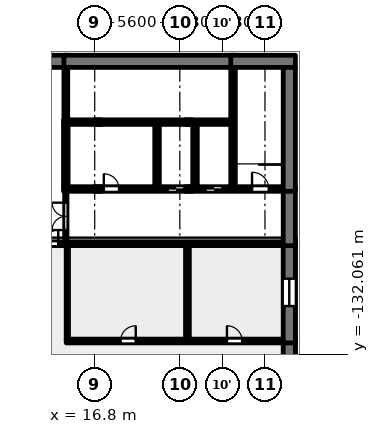
"""IFC4 building model, lengths in metres.
Left out: names, types, materials, properties, quantities, classifications, styles, units other than length and angle.
Written with IfcOpenShell. Run it as: python <this file> out.ifc"""

import sys

from ifc_helpers import new_model, si_unit, direction, frame, frame_2d, origin, origin_2d, place, context, subcontext, project, spatial, rectangle, extrude, element, fill, save


model = new_model("IFC4")
c1 = context("Model", 3, precision=1e-05, world=origin(), true_north=direction((0.0, 1.0)))
c2 = subcontext(c1, "Body", "Model", "MODEL_VIEW")
j1 = project(units=[si_unit("LENGTHUNIT", "METRE"), si_unit("PLANEANGLEUNIT", "RADIAN")], contexts=[c1])
p1 = place(None, origin())
s1 = spatial("IfcSite", under=j1, at=p1, CompositionType="ELEMENT")
p2 = place(p1, origin())
s2 = spatial("IfcBuilding", under=s1, at=p2, CompositionType="ELEMENT")
p3 = place(p2, frame((0.0, 0.0, 20.9)))
s3 = spatial("IfcBuildingStorey", under=s2, at=p3, CompositionType="ELEMENT", Elevation=20.9)
p4 = place(p3, frame((14.925, -131.2, 0.0), z_axis=(0.0, 0.0, 1.0), x_axis=(1.0, 0.0, 0.0)))
e1 = element("IfcWall", 1, at=p4, inside=s3, PredefinedType="SOLIDWALL", context=c2, shape_type="SweptSolid", body=[
    extrude(rectangle(XDim=14.275, YDim=0.25, at=frame_2d((7.137, 0.0))), origin(), (0.0, 0.0, 1.0), 4.5),
])
p5 = place(p4, frame((3.575, 0.0, 0.0)))
e2 = element("IfcOpeningElement", 2, at=p5, cuts=e1, PredefinedType="OPENING", context=c2, shape_type="SweptSolid", body=[
    extrude(rectangle(XDim=1.0, YDim=2.1, at=frame_2d((0.5, 1.05))), frame((0.0, 0.135, 0.0), z_axis=(0.0, -1.0, 0.0), x_axis=(1.0, 0.0, 0.0)), (0.0, 0.0, 1.0), 0.27),
])
p6 = place(p4, frame((10.575, 0.0, 0.0)))
e3 = element("IfcOpeningElement", 3, at=p6, cuts=e1, PredefinedType="OPENING", context=c2, shape_type="SweptSolid", body=[
    extrude(rectangle(XDim=1.0, YDim=2.1, at=frame_2d((0.5, 1.05))), frame((0.0, 0.135, 0.0), z_axis=(0.0, -1.0, 0.0), x_axis=(1.0, 0.0, 0.0)), (0.0, 0.0, 1.0), 0.27),
])
p7 = place(p3, frame((12.4, -124.8, 0.0), z_axis=(0.0, 0.0, 1.0), x_axis=(1.0, 0.0, 0.0)))
e4 = element("IfcWall", 4, at=p7, inside=s3, PredefinedType="SOLIDWALL", context=c2, shape_type="SweptSolid", body=[
    extrude(rectangle(XDim=16.8, YDim=0.25, at=frame_2d((8.4, 0.0))), origin(), (0.0, 0.0, 1.0), 4.5),
])
p8 = place(p7, frame((0.2, 0.0, 0.0)))
e5 = element("IfcOpeningElement", 5, at=p8, cuts=e4, PredefinedType="OPENING", context=c2, shape_type="SweptSolid", body=[
    extrude(rectangle(XDim=1.8, YDim=2.1, at=frame_2d((0.9, 1.05))), frame((0.0, 0.135, 0.0), z_axis=(0.0, -1.0, 0.0), x_axis=(1.0, 0.0, 0.0)), (0.0, 0.0, 1.0), 0.27),
])
p9 = place(p3, frame((14.75, -121.2, 0.0), z_axis=(0.0, 0.0, 1.0), x_axis=(1.0, 0.0, 0.0)))
e6 = element("IfcWall", 6, at=p9, inside=s3, PredefinedType="SOLIDWALL", context=c2, shape_type="SweptSolid", body=[
    extrude(rectangle(XDim=14.45, YDim=0.3, at=frame_2d((7.225, 0.0))), origin(), (0.0, 0.0, 1.0), 4.5),
])
p10 = place(p9, frame((6.85, 0.0, 0.0)))
e7 = element("IfcOpeningElement", 7, at=p10, cuts=e6, PredefinedType="OPENING", context=c2, shape_type="SweptSolid", body=[
    extrude(rectangle(XDim=1.1, YDim=2.1, at=frame_2d((0.55, 1.05))), frame((0.0, 0.16, 0.0), z_axis=(0.0, -1.0, 0.0), x_axis=(1.0, 0.0, 0.0)), (0.0, 0.0, 1.0), 0.32),
])
p11 = place(p9, frame((9.35, 0.0, 0.0)))
e8 = element("IfcOpeningElement", 8, at=p11, cuts=e6, PredefinedType="OPENING", context=c2, shape_type="SweptSolid", body=[
    extrude(rectangle(XDim=1.1, YDim=2.1, at=frame_2d((0.55, 1.05))), frame((0.0, 0.16, 0.0), z_axis=(0.0, -1.0, 0.0), x_axis=(1.0, 0.0, 0.0)), (0.0, 0.0, 1.0), 0.32),
])
p12 = place(p9, frame((12.4, 0.0, 0.0)))
e9 = element("IfcOpeningElement", 9, at=p12, cuts=e6, PredefinedType="OPENING", context=c2, shape_type="SweptSolid", body=[
    extrude(rectangle(XDim=1.1, YDim=2.1, at=frame_2d((0.55, 1.05))), frame((0.0, 0.16, 0.0), z_axis=(0.0, -1.0, 0.0), x_axis=(1.0, 0.0, 0.0)), (0.0, 0.0, 1.0), 0.32),
])
p13 = place(p9, frame((2.65, 0.0, 0.0)))
e10 = element("IfcOpeningElement", 10, at=p13, cuts=e6, PredefinedType="OPENING", context=c2, shape_type="SweptSolid", body=[
    extrude(rectangle(XDim=1.0, YDim=2.1, at=frame_2d((0.5, 1.05))), frame((0.0, 0.16, 0.0), z_axis=(0.0, -1.0, 0.0), x_axis=(1.0, 0.0, 0.0)), (0.0, 0.0, 1.0), 0.32),
])
p14 = place(p3, frame((14.75, -116.8, 0.0), z_axis=(0.0, 0.0, 1.0), x_axis=(1.0, 0.0, 0.0)))
e11 = element("IfcWall", 11, at=p14, inside=s3, PredefinedType="SOLIDWALL", context=c2, shape_type="SweptSolid", body=[
    extrude(rectangle(XDim=11.0, YDim=0.3, at=frame_2d((5.5, 0.0))), origin(), (0.0, 0.0, 1.0), 4.5),
])
p15 = place(p3, frame((-15.025, -112.8, 0.0), z_axis=(0.0, 0.0, 1.0), x_axis=(1.0, 0.0, 0.0)))
e12 = element("IfcWall", 12, at=p15, inside=s3, PredefinedType="SOLIDWALL", context=c2, shape_type="SweptSolid", body=[
    extrude(rectangle(XDim=30.05, YDim=0.8, at=frame_2d((15.025, 0.0))), origin(), (0.0, 0.0, 1.0), 4.5),
])
p16 = place(p15, frame((2.125, 0.0, 0.9)))
e13 = element("IfcOpeningElement", 13, at=p16, cuts=e12, PredefinedType="OPENING", context=c2, shape_type="SweptSolid", body=[
    extrude(rectangle(XDim=1.8, YDim=1.5, at=frame_2d((0.9, 0.75))), frame((0.0, 0.41, 0.0), z_axis=(0.0, -1.0, 0.0), x_axis=(1.0, 0.0, 0.0)), (0.0, 0.0, 1.0), 0.82),
])
p17 = place(p15, frame((5.125, 0.0, 0.9)))
e14 = element("IfcOpeningElement", 14, at=p17, cuts=e12, PredefinedType="OPENING", context=c2, shape_type="SweptSolid", body=[
    extrude(rectangle(XDim=1.8, YDim=1.5, at=frame_2d((0.9, 0.75))), frame((0.0, 0.41, 0.0), z_axis=(0.0, -1.0, 0.0), x_axis=(1.0, 0.0, 0.0)), (0.0, 0.0, 1.0), 0.82),
])
p18 = place(p15, frame((8.125, 0.0, 0.9)))
e15 = element("IfcOpeningElement", 15, at=p18, cuts=e12, PredefinedType="OPENING", context=c2, shape_type="SweptSolid", body=[
    extrude(rectangle(XDim=1.8, YDim=1.5, at=frame_2d((0.9, 0.75))), frame((0.0, 0.41, 0.0), z_axis=(0.0, -1.0, 0.0), x_axis=(1.0, 0.0, 0.0)), (0.0, 0.0, 1.0), 0.82),
])
p19 = place(p15, frame((11.125, 0.0, 0.9)))
e16 = element("IfcOpeningElement", 16, at=p19, cuts=e12, PredefinedType="OPENING", context=c2, shape_type="SweptSolid", body=[
    extrude(rectangle(XDim=1.8, YDim=1.5, at=frame_2d((0.9, 0.75))), frame((0.0, 0.41, 0.0), z_axis=(0.0, -1.0, 0.0), x_axis=(1.0, 0.0, 0.0)), (0.0, 0.0, 1.0), 0.82),
])
p20 = place(p15, frame((14.125, 0.0, 0.9)))
e17 = element("IfcOpeningElement", 17, at=p20, cuts=e12, PredefinedType="OPENING", context=c2, shape_type="SweptSolid", body=[
    extrude(rectangle(XDim=1.8, YDim=1.5, at=frame_2d((0.9, 0.75))), frame((0.0, 0.41, 0.0), z_axis=(0.0, -1.0, 0.0), x_axis=(1.0, 0.0, 0.0)), (0.0, 0.0, 1.0), 0.82),
])
p21 = place(p15, frame((17.125, 0.0, 0.9)))
e18 = element("IfcOpeningElement", 18, at=p21, cuts=e12, PredefinedType="OPENING", context=c2, shape_type="SweptSolid", body=[
    extrude(rectangle(XDim=1.8, YDim=1.5, at=frame_2d((0.9, 0.75))), frame((0.0, 0.41, 0.0), z_axis=(0.0, -1.0, 0.0), x_axis=(1.0, 0.0, 0.0)), (0.0, 0.0, 1.0), 0.82),
])
p22 = place(p15, frame((20.125, 0.0, 0.9)))
e19 = element("IfcOpeningElement", 19, at=p22, cuts=e12, PredefinedType="OPENING", context=c2, shape_type="SweptSolid", body=[
    extrude(rectangle(XDim=1.8, YDim=1.5, at=frame_2d((0.9, 0.75))), frame((0.0, 0.41, 0.0), z_axis=(0.0, -1.0, 0.0), x_axis=(1.0, 0.0, 0.0)), (0.0, 0.0, 1.0), 0.82),
])
p23 = place(p15, frame((23.125, 0.0, 0.9)))
e20 = element("IfcOpeningElement", 20, at=p23, cuts=e12, PredefinedType="OPENING", context=c2, shape_type="SweptSolid", body=[
    extrude(rectangle(XDim=1.8, YDim=1.5, at=frame_2d((0.9, 0.75))), frame((0.0, 0.41, 0.0), z_axis=(0.0, -1.0, 0.0), x_axis=(1.0, 0.0, 0.0)), (0.0, 0.0, 1.0), 0.82),
])
p24 = place(p15, frame((26.125, 0.0, 0.9)))
e21 = element("IfcOpeningElement", 21, at=p24, cuts=e12, PredefinedType="OPENING", context=c2, shape_type="SweptSolid", body=[
    extrude(rectangle(XDim=1.8, YDim=1.5, at=frame_2d((0.9, 0.75))), frame((0.0, 0.41, 0.0), z_axis=(0.0, -1.0, 0.0), x_axis=(1.0, 0.0, 0.0)), (0.0, 0.0, 1.0), 0.82),
])
p25 = place(p3, frame((14.775, -112.8, 0.0), z_axis=(0.0, 0.0, 1.0), x_axis=(1.0, 0.0, 0.0)))
e22 = element("IfcWall", 22, at=p25, inside=s3, PredefinedType="SOLIDWALL", context=c2, shape_type="SweptSolid", body=[
    extrude(rectangle(XDim=11.275, YDim=0.8, at=frame_2d((5.637, 0.0))), origin(), (0.0, 0.0, 1.0), 4.5),
])
p26 = place(p3, frame((25.75, -112.8, 0.0), z_axis=(0.0, 0.0, 1.0), x_axis=(1.0, 0.0, 0.0)))
e23 = element("IfcWall", 23, at=p26, inside=s3, PredefinedType="SOLIDWALL", context=c2, shape_type="SweptSolid", body=[
    extrude(rectangle(XDim=4.25, YDim=0.8, at=frame_2d((2.125, 0.0))), origin(), (0.0, 0.0, 1.0), 4.5),
])
p27 = place(p3, frame((14.9, -124.675, 0.0), z_axis=(0.0, 0.0, 1.0), x_axis=(0.0, 1.0, 0.0)))
e24 = element("IfcWall", 24, at=p27, inside=s3, PredefinedType="PARTITIONING", context=c2, shape_type="SweptSolid", body=[
    extrude(rectangle(XDim=3.325, YDim=0.15, at=frame_2d((1.663, 0.0))), origin(), (0.0, 0.0, 1.0), 4.5),
])
p28 = place(p27, frame((0.775, 0.0, 0.0)))
e25 = element("IfcOpeningElement", 25, at=p28, cuts=e24, PredefinedType="OPENING", context=c2, shape_type="SweptSolid", body=[
    extrude(rectangle(XDim=1.8, YDim=2.1, at=frame_2d((0.9, 1.05))), frame((0.0, 0.085, 0.0), z_axis=(0.0, -1.0, 0.0), x_axis=(1.0, 0.0, 0.0)), (0.0, 0.0, 1.0), 0.17),
])
p29 = place(p3, frame((14.9, -121.05, 0.0), z_axis=(0.0, 0.0, 1.0), x_axis=(0.0, 1.0, 0.0)))
e26 = element("IfcWall", 26, at=p29, inside=s3, PredefinedType="SOLIDWALL", context=c2, shape_type="SweptSolid", body=[
    extrude(rectangle(XDim=4.1, YDim=0.3, at=frame_2d((2.05, 0.0))), origin(), (0.0, 0.0, 1.0), 4.5),
])
p30 = place(p3, frame((14.9, -116.65, 0.0), z_axis=(0.0, 0.0, 1.0), x_axis=(0.0, 1.0, 0.0)))
e27 = element("IfcWall", 27, at=p30, inside=s3, PredefinedType="SOLIDWALL", context=c2, shape_type="SweptSolid", body=[
    extrude(rectangle(XDim=3.45, YDim=0.25, at=frame_2d((1.725, 0.0))), origin(), (0.0, 0.0, 1.0), 4.5),
])
p31 = place(p3, frame((15.0, -131.075, 0.0), z_axis=(0.0, 0.0, 1.0), x_axis=(0.0, 1.0, 0.0)))
e28 = element("IfcWall", 28, at=p31, inside=s3, PredefinedType="PARTITIONING", context=c2, shape_type="SweptSolid", body=[
    extrude(rectangle(XDim=6.15, YDim=0.15, at=frame_2d((3.075, 0.0))), origin(), (0.0, 0.0, 1.0), 4.5),
])
p32 = place(p3, frame((20.9, -121.05, 0.0), z_axis=(0.0, 0.0, 1.0), x_axis=(0.0, 1.0, 0.0)))
e29 = element("IfcWall", 29, at=p32, inside=s3, PredefinedType="SOLIDWALL", context=c2, shape_type="SweptSolid", body=[
    extrude(rectangle(XDim=4.1, YDim=0.3, at=frame_2d((2.05, 0.0))), origin(), (0.0, 0.0, 1.0), 4.5),
])
p33 = place(p3, frame((22.9, -131.075, 0.0), z_axis=(0.0, 0.0, 1.0), x_axis=(0.0, 1.0, 0.0)))
e30 = element("IfcWall", 30, at=p33, inside=s3, PredefinedType="SOLIDWALL", context=c2, shape_type="SweptSolid", body=[
    extrude(rectangle(XDim=6.15, YDim=0.25, at=frame_2d((3.075, 0.0))), origin(), (0.0, 0.0, 1.0), 4.5),
])
p34 = place(p3, frame((23.4, -121.05, 0.0), z_axis=(0.0, 0.0, 1.0), x_axis=(0.0, 1.0, 0.0)))
e31 = element("IfcWall", 31, at=p34, inside=s3, PredefinedType="SOLIDWALL", context=c2, shape_type="SweptSolid", body=[
    extrude(rectangle(XDim=4.1, YDim=0.3, at=frame_2d((2.05, 0.0))), origin(), (0.0, 0.0, 1.0), 4.5),
])
p35 = place(p3, frame((25.9, -121.05, 0.0), z_axis=(0.0, 0.0, 1.0), x_axis=(0.0, 1.0, 0.0)))
e32 = element("IfcWall", 32, at=p35, inside=s3, PredefinedType="SOLIDWALL", context=c2, shape_type="SweptSolid", body=[
    extrude(rectangle(XDim=7.85, YDim=0.3, at=frame_2d((3.925, 0.0))), origin(), (0.0, 0.0, 1.0), 4.5),
])
p36 = place(p3, frame((29.6, -131.075, 0.0), z_axis=(0.0, 0.0, 1.0), x_axis=(0.0, -1.0, 0.0)))
e33 = element("IfcWall", 33, at=p36, inside=s3, PredefinedType="SOLIDWALL", context=c2, shape_type="SweptSolid", body=[
    extrude(rectangle(XDim=8.275, YDim=0.8, at=frame_2d((4.137, 0.0))), origin(), (0.0, 0.0, 1.0), 4.5),
])
p37 = place(p36, frame((4.725, 0.0, 0.6)))
e34 = element("IfcOpeningElement", 34, at=p37, cuts=e33, PredefinedType="OPENING", context=c2, shape_type="SweptSolid", body=[
    extrude(rectangle(XDim=2.4, YDim=3.2, at=frame_2d((1.2, 1.6))), frame((0.0, 0.41, 0.0), z_axis=(0.0, -1.0, 0.0), x_axis=(1.0, 0.0, 0.0)), (0.0, 0.0, 1.0), 0.82),
])
p38 = place(p36, frame((1.125, 0.0, 0.6)))
e35 = element("IfcOpeningElement", 35, at=p38, cuts=e33, PredefinedType="OPENING", context=c2, shape_type="SweptSolid", body=[
    extrude(rectangle(XDim=2.4, YDim=3.2, at=frame_2d((1.2, 1.6))), frame((0.0, 0.41, 0.0), z_axis=(0.0, -1.0, 0.0), x_axis=(1.0, 0.0, 0.0)), (0.0, 0.0, 1.0), 0.82),
])
p39 = place(p3, frame((29.6, -124.675, 0.0), z_axis=(0.0, 0.0, 1.0), x_axis=(0.0, -1.0, 0.0)))
e36 = element("IfcWall", 36, at=p39, inside=s3, PredefinedType="SOLIDWALL", context=c2, shape_type="SweptSolid", body=[
    extrude(rectangle(XDim=6.65, YDim=0.8, at=frame_2d((3.325, 0.0))), origin(), (0.0, 0.0, 1.0), 4.5),
])
p40 = place(p39, frame((2.425, 0.0, 0.9)))
e37 = element("IfcOpeningElement", 37, at=p40, cuts=e36, PredefinedType="OPENING", context=c2, shape_type="SweptSolid", body=[
    extrude(rectangle(XDim=1.8, YDim=1.5, at=frame_2d((0.9, 0.75))), frame((0.0, 0.41, 0.0), z_axis=(0.0, -1.0, 0.0), x_axis=(1.0, 0.0, 0.0)), (0.0, 0.0, 1.0), 0.82),
])
p41 = place(p3, frame((29.6, -121.05, 0.0), z_axis=(0.0, 0.0, 1.0), x_axis=(0.0, -1.0, 0.0)))
e38 = element("IfcWall", 38, at=p41, inside=s3, PredefinedType="SOLIDWALL", context=c2, shape_type="SweptSolid", body=[
    extrude(rectangle(XDim=3.875, YDim=0.8, at=frame_2d((1.938, 0.0))), origin(), (0.0, 0.0, 1.0), 4.5),
])
p42 = place(p3, frame((29.6, -113.2, 0.0), z_axis=(0.0, 0.0, 1.0), x_axis=(0.0, -1.0, 0.0)))
e39 = element("IfcWall", 39, at=p42, inside=s3, PredefinedType="SOLIDWALL", context=c2, shape_type="SweptSolid", body=[
    extrude(rectangle(XDim=8.15, YDim=0.8, at=frame_2d((4.075, 0.0))), origin(), (0.0, 0.0, 1.0), 4.5),
])
p43 = place(p3, frame((29.85, -159.85, 4.8), z_axis=(0.0, 0.0, 1.0), x_axis=(0.0, 1.0, 0.0)))
e40 = element("IfcWall", 40, at=p43, inside=s3, PredefinedType="PARAPET", context=c2, shape_type="SweptSolid", body=[
    extrude(rectangle(XDim=35.45, YDim=0.3, at=frame_2d((17.725, 0.0))), origin(), (0.0, 0.0, 1.0), 1.0),
])
for number, where, z_axis, x_axis in (
    (41, (17.0, -121.2, 4.5), (0.0, 0.0, 1.0), (1.0, 0.0, 0.0)),
    (42, (23.0, -121.2, 4.5), (0.0, 0.0, 1.0), (1.0, 0.0, 0.0)),
):
    element("IfcColumn", number, at=place(p3, frame(where, z_axis=z_axis, x_axis=x_axis)), inside=s3, PredefinedType="COLUMN", context=c2, shape_type="SweptSolid", body=[
        extrude(rectangle(XDim=0.3, YDim=0.3, at=origin_2d()), origin(), (0.0, 0.0, 1.0), 1.937),
    ])
for number, where, z_axis, x_axis in (
    (43, (17.0, -116.8, 4.5), (0.0, 0.0, 1.0), (1.0, 0.0, 0.0)),
    (44, (23.0, -116.8, 4.5), (0.0, 0.0, 1.0), (1.0, 0.0, 0.0)),
):
    element("IfcColumn", number, at=place(p3, frame(where, z_axis=z_axis, x_axis=x_axis)), inside=s3, PredefinedType="COLUMN", context=c2, shape_type="SweptSolid", body=[
        extrude(rectangle(XDim=0.3, YDim=0.3, at=origin_2d()), origin(), (0.0, 0.0, 1.0), 2.252),
    ])
p44 = place(p40, origin())
e45 = element("IfcWindow", 45, at=p44, inside=s3, PartitioningType="SINGLE_PANEL", PredefinedType="WINDOW", context=c2, shape_type="SweptSolid", body=[
    extrude(rectangle(XDim=1.8, YDim=1.5, at=frame_2d((0.9, 0.75))), frame((0.0, 0.03, 0.0), z_axis=(0.0, -1.0, 0.0), x_axis=(1.0, 0.0, 0.0)), (0.0, 0.0, 1.0), 0.06),
])
fill(e37, e45)
p45 = place(p10, origin())
e46 = element("IfcDoor", 46, at=p45, inside=s3, OperationType="DOUBLE_DOOR_SLIDING", PredefinedType="DOOR", context=c2, shape_type="SweptSolid", body=[
    extrude(rectangle(XDim=1.1, YDim=2.1, at=frame_2d((0.55, 1.05))), frame((0.0, 0.025, 0.0), z_axis=(0.0, -1.0, 0.0), x_axis=(1.0, 0.0, 0.0)), (0.0, 0.0, 1.0), 0.05),
])
fill(e7, e46)
p46 = place(p11, origin())
e47 = element("IfcDoor", 47, at=p46, inside=s3, OperationType="DOUBLE_DOOR_SLIDING", PredefinedType="DOOR", context=c2, shape_type="SweptSolid", body=[
    extrude(rectangle(XDim=1.1, YDim=2.1, at=frame_2d((0.55, 1.05))), frame((0.0, 0.025, 0.0), z_axis=(0.0, -1.0, 0.0), x_axis=(1.0, 0.0, 0.0)), (0.0, 0.0, 1.0), 0.05),
])
fill(e8, e47)
p47 = place(p12, origin())
e48 = element("IfcDoor", 48, at=p47, inside=s3, OperationType="SINGLE_SWING_LEFT", PredefinedType="DOOR", context=c2, shape_type="SweptSolid", body=[
    extrude(rectangle(XDim=1.1, YDim=2.1, at=frame_2d((0.55, 1.05))), frame((0.0, 0.025, 0.0), z_axis=(0.0, -1.0, 0.0), x_axis=(1.0, 0.0, 0.0)), (0.0, 0.0, 1.0), 0.05),
])
fill(e9, e48)
p48 = place(p13, origin())
e49 = element("IfcDoor", 49, at=p48, inside=s3, OperationType="SINGLE_SWING_LEFT", PredefinedType="DOOR", context=c2, shape_type="SweptSolid", body=[
    extrude(rectangle(XDim=1.0, YDim=2.1, at=frame_2d((0.5, 1.05))), frame((0.0, 0.025, 0.0), z_axis=(0.0, -1.0, 0.0), x_axis=(1.0, 0.0, 0.0)), (0.0, 0.0, 1.0), 0.05),
])
fill(e10, e49)
p49 = place(p28, origin())
e50 = element("IfcDoor", 50, at=p49, inside=s3, OperationType="DOUBLE_DOOR_SINGLE_SWING", PredefinedType="DOOR", context=c2, shape_type="SweptSolid", body=[
    extrude(rectangle(XDim=1.8, YDim=2.1, at=frame_2d((0.9, 1.05))), frame((0.0, 0.025, 0.0), z_axis=(0.0, -1.0, 0.0), x_axis=(1.0, 0.0, 0.0)), (0.0, 0.0, 1.0), 0.05),
])
fill(e25, e50)
p50 = place(p8, origin())
e51 = element("IfcDoor", 51, at=p50, inside=s3, OperationType="DOUBLE_DOOR_SINGLE_SWING", PredefinedType="DOOR", context=c2, shape_type="SweptSolid", body=[
    extrude(rectangle(XDim=1.8, YDim=2.1, at=frame_2d((0.9, 1.05))), frame((0.0, 0.025, 0.0), z_axis=(0.0, -1.0, 0.0), x_axis=(1.0, 0.0, 0.0)), (0.0, 0.0, 1.0), 0.05),
])
fill(e5, e51)
p51 = place(p5, origin())
e52 = element("IfcDoor", 52, at=p51, inside=s3, OperationType="SINGLE_SWING_RIGHT", PredefinedType="DOOR", context=c2, shape_type="SweptSolid", body=[
    extrude(rectangle(XDim=1.0, YDim=2.1, at=frame_2d((0.5, 1.05))), frame((0.0, 0.025, 0.0), z_axis=(0.0, -1.0, 0.0), x_axis=(1.0, 0.0, 0.0)), (0.0, 0.0, 1.0), 0.05),
])
fill(e2, e52)
p52 = place(p6, origin())
e53 = element("IfcDoor", 53, at=p52, inside=s3, OperationType="SINGLE_SWING_LEFT", PredefinedType="DOOR", context=c2, shape_type="SweptSolid", body=[
    extrude(rectangle(XDim=1.0, YDim=2.1, at=frame_2d((0.5, 1.05))), frame((0.0, 0.025, 0.0), z_axis=(0.0, -1.0, 0.0), x_axis=(1.0, 0.0, 0.0)), (0.0, 0.0, 1.0), 0.05),
])
fill(e3, e53)
save(model, sys.argv[1])
